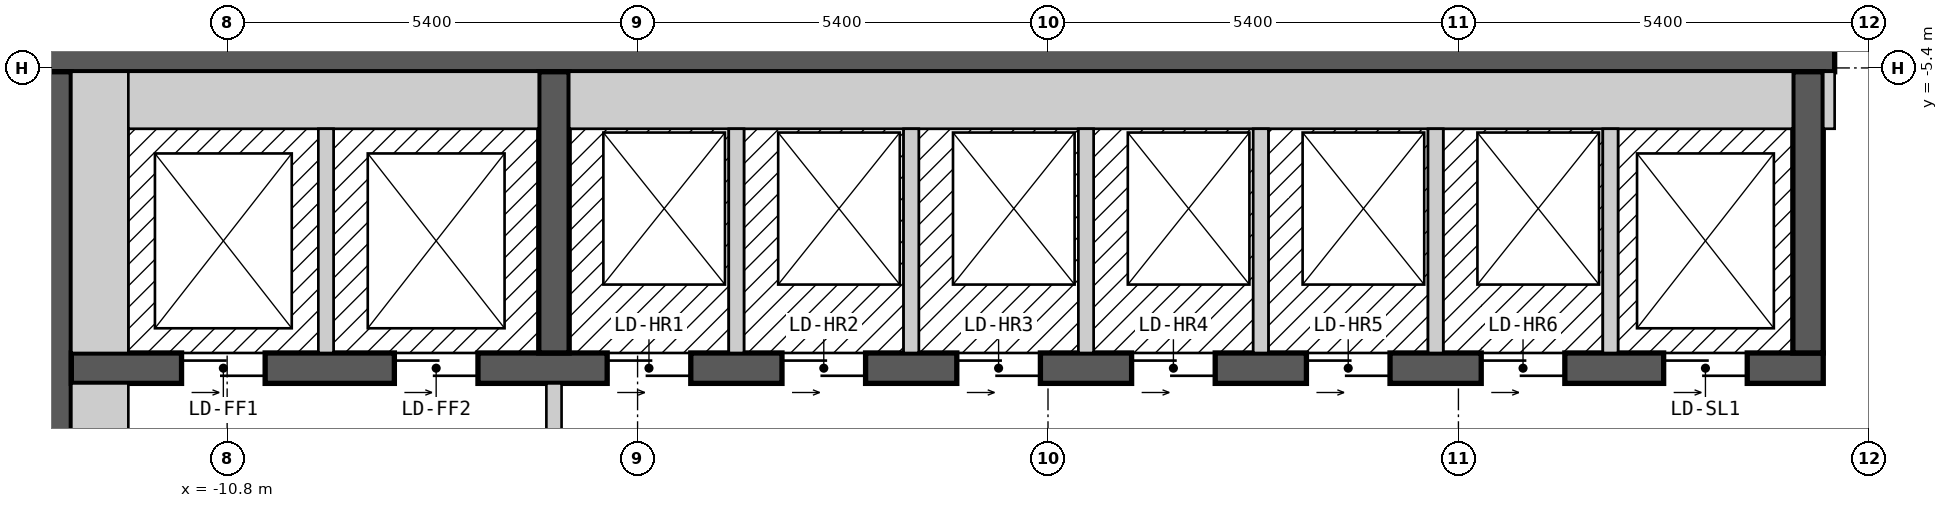
"""IFC4 building model, lengths in metres.
Left out: names, types, materials, properties, quantities, classifications, styles, units other than length and angle.
Written with IfcOpenShell. Run it as: python <this file> out.ifc"""

import sys

from ifc_helpers import new_model, si_unit, direction, frame, frame_2d, origin, place, context, subcontext, project, spatial, rectangle, extrude, element, fill, save


model = new_model("IFC4")
c1 = context("Model", 3, precision=1e-05, world=origin(), true_north=direction((0.0, 1.0)))
c2 = subcontext(c1, "Body", "Model", "MODEL_VIEW")
j1 = project(units=[si_unit("LENGTHUNIT", "METRE"), si_unit("PLANEANGLEUNIT", "RADIAN")], contexts=[c1])
p1 = place(None, origin())
s1 = spatial("IfcSite", under=j1, at=p1, CompositionType="ELEMENT")
p2 = place(p1, origin())
s2 = spatial("IfcBuilding", under=s1, at=p2, CompositionType="ELEMENT")
p3 = place(p2, frame((0.0, 0.0, 217.8)))
s3 = spatial("IfcBuildingStorey", under=s2, at=p3, CompositionType="ELEMENT", Elevation=217.8)
p4 = place(p3, frame((-13.3, -5.225, 0.0), z_axis=(0.0, 0.0, 1.0), x_axis=(1.0, 0.0, 0.0)))
e1 = element("IfcWall", 1, at=p4, inside=s3, PredefinedType="SHEAR", context=c2, shape_type="SweptSolid", body=[
    extrude(rectangle(XDim=26.6, YDim=0.45, at=frame_2d((13.3, 0.0))), origin(), (0.0, 0.0, 1.0), 2.7),
])
p5 = place(p4, frame((23.65, 0.0, 0.0)))
e2 = element("IfcOpeningElement", 2, at=p5, cuts=e1, PredefinedType="OPENING", context=c2, shape_type="SweptSolid", body=[
    extrude(rectangle(XDim=1.2, YDim=2.1, at=frame_2d((0.6, 1.05))), frame((0.0, 0.235, 0.0), z_axis=(0.0, -1.0, 0.0), x_axis=(1.0, 0.0, 0.0)), (0.0, 0.0, 1.0), 0.47),
])
p6 = place(p3, frame((-13.075, -18.55, 0.0), z_axis=(0.0, 0.0, 1.0), x_axis=(0.0, 1.0, 0.0)))
e3 = element("IfcWall", 3, at=p6, inside=s3, PredefinedType="SHEAR", context=c2, shape_type="SweptSolid", body=[
    extrude(rectangle(XDim=13.1, YDim=0.45, at=frame_2d((6.55, 0.0))), origin(), (0.0, 0.0, 1.0), 2.7),
])
p7 = place(p6, frame((4.35, 0.0, 0.0)))
e4 = element("IfcOpeningElement", 4, at=p7, cuts=e3, PredefinedType="OPENING", context=c2, shape_type="SweptSolid", body=[
    extrude(rectangle(XDim=1.2, YDim=2.1, at=frame_2d((0.6, 1.05))), frame((0.0, 0.235, 0.0), z_axis=(0.0, -1.0, 0.0), x_axis=(1.0, 0.0, 0.0)), (0.0, 0.0, 1.0), 0.47),
])
p8 = place(p3, frame((-12.85, -9.35, 0.0), z_axis=(0.0, 0.0, 1.0), x_axis=(1.0, 0.0, 0.0)))
e5 = element("IfcWall", 5, at=p8, inside=s3, PredefinedType="SHEAR", context=c2, shape_type="SweptSolid", body=[
    extrude(rectangle(XDim=23.05, YDim=0.4, at=frame_2d((11.525, 0.0))), origin(), (0.0, 0.0, 1.0), 2.7),
])
p9 = place(p8, frame((1.45, 0.0, 0.0)))
e6 = element("IfcOpeningElement", 6, at=p9, cuts=e5, PredefinedType="OPENING", context=c2, shape_type="SweptSolid", body=[
    extrude(rectangle(XDim=1.1, YDim=2.1, at=frame_2d((0.55, 1.05))), frame((0.0, 0.21, 0.0), z_axis=(0.0, -1.0, 0.0), x_axis=(1.0, 0.0, 0.0)), (0.0, 0.0, 1.0), 0.42),
])
p10 = place(p8, frame((4.25, 0.0, 0.0)))
e7 = element("IfcOpeningElement", 7, at=p10, cuts=e5, PredefinedType="OPENING", context=c2, shape_type="SweptSolid", body=[
    extrude(rectangle(XDim=1.1, YDim=2.1, at=frame_2d((0.55, 1.05))), frame((0.0, 0.21, 0.0), z_axis=(0.0, -1.0, 0.0), x_axis=(1.0, 0.0, 0.0)), (0.0, 0.0, 1.0), 0.42),
])
p11 = place(p8, frame((7.05, 0.0, 0.0)))
e8 = element("IfcOpeningElement", 8, at=p11, cuts=e5, PredefinedType="OPENING", context=c2, shape_type="SweptSolid", body=[
    extrude(rectangle(XDim=1.1, YDim=2.1, at=frame_2d((0.55, 1.05))), frame((0.0, 0.21, 0.0), z_axis=(0.0, -1.0, 0.0), x_axis=(1.0, 0.0, 0.0)), (0.0, 0.0, 1.0), 0.42),
])
p12 = place(p8, frame((9.35, 0.0, 0.0)))
e9 = element("IfcOpeningElement", 9, at=p12, cuts=e5, PredefinedType="OPENING", context=c2, shape_type="SweptSolid", body=[
    extrude(rectangle(XDim=1.1, YDim=2.1, at=frame_2d((0.55, 1.05))), frame((0.0, 0.21, 0.0), z_axis=(0.0, -1.0, 0.0), x_axis=(1.0, 0.0, 0.0)), (0.0, 0.0, 1.0), 0.42),
])
p13 = place(p8, frame((11.65, 0.0, 0.0)))
e10 = element("IfcOpeningElement", 10, at=p13, cuts=e5, PredefinedType="OPENING", context=c2, shape_type="SweptSolid", body=[
    extrude(rectangle(XDim=1.1, YDim=2.1, at=frame_2d((0.55, 1.05))), frame((0.0, 0.21, 0.0), z_axis=(0.0, -1.0, 0.0), x_axis=(1.0, 0.0, 0.0)), (0.0, 0.0, 1.0), 0.42),
])
p14 = place(p8, frame((13.95, 0.0, 0.0)))
e11 = element("IfcOpeningElement", 11, at=p14, cuts=e5, PredefinedType="OPENING", context=c2, shape_type="SweptSolid", body=[
    extrude(rectangle(XDim=1.1, YDim=2.1, at=frame_2d((0.55, 1.05))), frame((0.0, 0.21, 0.0), z_axis=(0.0, -1.0, 0.0), x_axis=(1.0, 0.0, 0.0)), (0.0, 0.0, 1.0), 0.42),
])
p15 = place(p8, frame((16.25, 0.0, 0.0)))
e12 = element("IfcOpeningElement", 12, at=p15, cuts=e5, PredefinedType="OPENING", context=c2, shape_type="SweptSolid", body=[
    extrude(rectangle(XDim=1.1, YDim=2.1, at=frame_2d((0.55, 1.05))), frame((0.0, 0.21, 0.0), z_axis=(0.0, -1.0, 0.0), x_axis=(1.0, 0.0, 0.0)), (0.0, 0.0, 1.0), 0.42),
])
p16 = place(p8, frame((18.55, 0.0, 0.0)))
e13 = element("IfcOpeningElement", 13, at=p16, cuts=e5, PredefinedType="OPENING", context=c2, shape_type="SweptSolid", body=[
    extrude(rectangle(XDim=1.1, YDim=2.1, at=frame_2d((0.55, 1.05))), frame((0.0, 0.21, 0.0), z_axis=(0.0, -1.0, 0.0), x_axis=(1.0, 0.0, 0.0)), (0.0, 0.0, 1.0), 0.42),
])
p17 = place(p8, frame((20.95, 0.0, 0.0)))
e14 = element("IfcOpeningElement", 14, at=p17, cuts=e5, PredefinedType="OPENING", context=c2, shape_type="SweptSolid", body=[
    extrude(rectangle(XDim=1.1, YDim=2.1, at=frame_2d((0.55, 1.05))), frame((0.0, 0.21, 0.0), z_axis=(0.0, -1.0, 0.0), x_axis=(1.0, 0.0, 0.0)), (0.0, 0.0, 1.0), 0.42),
])
for number, where, z_axis, x_axis in (
    (15, (-6.5, -9.15, 0.0), (0.0, 0.0, 1.0), (0.0, 1.0, 0.0)),
    (16, (10.0, -9.15, 0.0), (0.0, 0.0, 1.0), (0.0, 1.0, 0.0)),
):
    element("IfcWall", number, at=place(p3, frame(where, z_axis=z_axis, x_axis=x_axis)), inside=s3, PredefinedType="SHEAR", context=c2, shape_type="SweptSolid", body=[
        extrude(rectangle(XDim=3.7, YDim=0.4, at=frame_2d((1.85, 0.0))), origin(), (0.0, 0.0, 1.0), 2.7),
    ])
p18 = place(p3, frame((-12.475, -13.0, 0.0), z_axis=(0.0, 0.0, 1.0), x_axis=(0.0, 1.0, 0.0)))
e17 = element("IfcWall", 17, at=p18, inside=s3, PredefinedType="PARTITIONING", context=c2, shape_type="SweptSolid", body=[
    extrude(rectangle(XDim=3.45, YDim=0.75, at=frame_2d((1.725, 0.0))), origin(), (0.0, 0.0, 1.0), 2.7),
])
p19 = place(p3, frame((-12.475, -9.15, 0.0), z_axis=(0.0, 0.0, 1.0), x_axis=(0.0, 1.0, 0.0)))
e18 = element("IfcWall", 18, at=p19, inside=s3, PredefinedType="SOLIDWALL", context=c2, shape_type="SweptSolid", body=[
    extrude(rectangle(XDim=3.7, YDim=0.75, at=frame_2d((1.85, 0.0))), origin(), (0.0, 0.0, 1.0), 2.7),
])
p20 = place(p3, frame((-12.1, -5.825, 0.0), z_axis=(0.0, 0.0, 1.0), x_axis=(1.0, 0.0, 0.0)))
e19 = element("IfcWall", 19, at=p20, inside=s3, PredefinedType="SOLIDWALL", context=c2, shape_type="SweptSolid", body=[
    extrude(rectangle(XDim=5.4, YDim=0.75, at=frame_2d((2.7, 0.0))), origin(), (0.0, 0.0, 1.0), 2.7),
])
p21 = place(p3, frame((-9.5, -9.15, 0.0), z_axis=(0.0, 0.0, 1.0), x_axis=(0.0, 1.0, 0.0)))
e20 = element("IfcWall", 20, at=p21, inside=s3, PredefinedType="SOLIDWALL", context=c2, shape_type="SweptSolid", body=[
    extrude(rectangle(XDim=2.95, YDim=0.2, at=frame_2d((1.475, 0.0))), origin(), (0.0, 0.0, 1.0), 2.7),
])
p22 = place(p3, frame((-6.5, -14.45, 0.0), z_axis=(0.0, 0.0, 1.0), x_axis=(0.0, 1.0, 0.0)))
e21 = element("IfcWall", 21, at=p22, inside=s3, PredefinedType="PARTITIONING", context=c2, shape_type="SweptSolid", body=[
    extrude(rectangle(XDim=4.9, YDim=0.2, at=frame_2d((2.45, 0.0))), origin(), (0.0, 0.0, 1.0), 2.7),
])
p23 = place(p22, frame((3.15, 0.0, 0.0), z_axis=(0.0, 0.0, 1.0), x_axis=(-1.0, 0.0, 0.0)))
e22 = element("IfcOpeningElement", 22, at=p23, cuts=e21, PredefinedType="OPENING", context=c2, shape_type="SweptSolid", body=[
    extrude(rectangle(XDim=1.4, YDim=2.1, at=frame_2d((0.7, 1.05))), frame((0.0, 0.11, 0.0), z_axis=(0.0, -1.0, 0.0), x_axis=(1.0, 0.0, 0.0)), (0.0, 0.0, 1.0), 0.22),
])
p24 = place(p3, frame((-6.3, -5.825, 0.0), z_axis=(0.0, 0.0, 1.0), x_axis=(1.0, 0.0, 0.0)))
e23 = element("IfcWall", 23, at=p24, inside=s3, PredefinedType="SOLIDWALL", context=c2, shape_type="SweptSolid", body=[
    extrude(rectangle(XDim=16.1, YDim=0.75, at=frame_2d((8.05, 0.0))), origin(), (0.0, 0.0, 1.0), 2.7),
])
for number, where, z_axis, x_axis in (
    (24, (-4.1, -9.15, 0.0), (0.0, 0.0, 1.0), (0.0, 1.0, 0.0)),
    (25, (-1.8, -9.15, 0.0), (0.0, 0.0, 1.0), (0.0, 1.0, 0.0)),
    (26, (0.5, -9.15, 0.0), (0.0, 0.0, 1.0), (0.0, 1.0, 0.0)),
    (27, (2.8, -9.15, 0.0), (0.0, 0.0, 1.0), (0.0, 1.0, 0.0)),
    (28, (5.1, -9.15, 0.0), (0.0, 0.0, 1.0), (0.0, 1.0, 0.0)),
    (29, (7.4, -9.15, 0.0), (0.0, 0.0, 1.0), (0.0, 1.0, 0.0)),
):
    element("IfcWall", number, at=place(p3, frame(where, z_axis=z_axis, x_axis=x_axis)), inside=s3, PredefinedType="SOLIDWALL", context=c2, shape_type="SweptSolid", body=[
        extrude(rectangle(XDim=2.95, YDim=0.2, at=frame_2d((1.475, 0.0))), origin(), (0.0, 0.0, 1.0), 2.7),
    ])
p25 = place(p3, frame((10.275, -6.2, 0.0), z_axis=(0.0, 0.0, 1.0), x_axis=(0.0, 1.0, 0.0)))
e30 = element("IfcWall", 30, at=p25, inside=s3, PredefinedType="PARTITIONING", context=c2, shape_type="SweptSolid", body=[
    extrude(rectangle(XDim=0.75, YDim=0.15, at=frame_2d((0.375, 0.0))), origin(), (0.0, 0.0, 1.0), 2.7),
])
p26 = place(p9, origin())
e31 = element("IfcDoor", 31, at=p26, inside=s3, OperationType="DOUBLE_DOOR_SLIDING", PredefinedType="DOOR", context=c2, shape_type="SweptSolid", body=[
    extrude(rectangle(XDim=1.1, YDim=2.1, at=frame_2d((0.55, 1.05))), frame((0.0, 0.025, 0.0), z_axis=(0.0, -1.0, 0.0), x_axis=(1.0, 0.0, 0.0)), (0.0, 0.0, 1.0), 0.05),
])
fill(e6, e31)
p27 = place(p10, origin())
e32 = element("IfcDoor", 32, at=p27, inside=s3, OperationType="DOUBLE_DOOR_SLIDING", PredefinedType="DOOR", context=c2, shape_type="SweptSolid", body=[
    extrude(rectangle(XDim=1.1, YDim=2.1, at=frame_2d((0.55, 1.05))), frame((0.0, 0.025, 0.0), z_axis=(0.0, -1.0, 0.0), x_axis=(1.0, 0.0, 0.0)), (0.0, 0.0, 1.0), 0.05),
])
fill(e7, e32)
p28 = place(p11, origin())
e33 = element("IfcDoor", 33, at=p28, inside=s3, OperationType="DOUBLE_DOOR_SLIDING", PredefinedType="DOOR", context=c2, shape_type="SweptSolid", body=[
    extrude(rectangle(XDim=1.1, YDim=2.1, at=frame_2d((0.55, 1.05))), frame((0.0, 0.025, 0.0), z_axis=(0.0, -1.0, 0.0), x_axis=(1.0, 0.0, 0.0)), (0.0, 0.0, 1.0), 0.05),
])
fill(e8, e33)
p29 = place(p12, origin())
e34 = element("IfcDoor", 34, at=p29, inside=s3, OperationType="DOUBLE_DOOR_SLIDING", PredefinedType="DOOR", context=c2, shape_type="SweptSolid", body=[
    extrude(rectangle(XDim=1.1, YDim=2.1, at=frame_2d((0.55, 1.05))), frame((0.0, 0.025, 0.0), z_axis=(0.0, -1.0, 0.0), x_axis=(1.0, 0.0, 0.0)), (0.0, 0.0, 1.0), 0.05),
])
fill(e9, e34)
p30 = place(p13, origin())
e35 = element("IfcDoor", 35, at=p30, inside=s3, OperationType="DOUBLE_DOOR_SLIDING", PredefinedType="DOOR", context=c2, shape_type="SweptSolid", body=[
    extrude(rectangle(XDim=1.1, YDim=2.1, at=frame_2d((0.55, 1.05))), frame((0.0, 0.025, 0.0), z_axis=(0.0, -1.0, 0.0), x_axis=(1.0, 0.0, 0.0)), (0.0, 0.0, 1.0), 0.05),
])
fill(e10, e35)
p31 = place(p14, origin())
e36 = element("IfcDoor", 36, at=p31, inside=s3, OperationType="DOUBLE_DOOR_SLIDING", PredefinedType="DOOR", context=c2, shape_type="SweptSolid", body=[
    extrude(rectangle(XDim=1.1, YDim=2.1, at=frame_2d((0.55, 1.05))), frame((0.0, 0.025, 0.0), z_axis=(0.0, -1.0, 0.0), x_axis=(1.0, 0.0, 0.0)), (0.0, 0.0, 1.0), 0.05),
])
fill(e11, e36)
p32 = place(p15, origin())
e37 = element("IfcDoor", 37, at=p32, inside=s3, OperationType="DOUBLE_DOOR_SLIDING", PredefinedType="DOOR", context=c2, shape_type="SweptSolid", body=[
    extrude(rectangle(XDim=1.1, YDim=2.1, at=frame_2d((0.55, 1.05))), frame((0.0, 0.025, 0.0), z_axis=(0.0, -1.0, 0.0), x_axis=(1.0, 0.0, 0.0)), (0.0, 0.0, 1.0), 0.05),
])
fill(e12, e37)
p33 = place(p16, origin())
e38 = element("IfcDoor", 38, at=p33, inside=s3, OperationType="DOUBLE_DOOR_SLIDING", PredefinedType="DOOR", context=c2, shape_type="SweptSolid", body=[
    extrude(rectangle(XDim=1.1, YDim=2.1, at=frame_2d((0.55, 1.05))), frame((0.0, 0.025, 0.0), z_axis=(0.0, -1.0, 0.0), x_axis=(1.0, 0.0, 0.0)), (0.0, 0.0, 1.0), 0.05),
])
fill(e13, e38)
p34 = place(p17, origin())
e39 = element("IfcDoor", 39, at=p34, inside=s3, OperationType="DOUBLE_DOOR_SLIDING", PredefinedType="DOOR", context=c2, shape_type="SweptSolid", body=[
    extrude(rectangle(XDim=1.1, YDim=2.1, at=frame_2d((0.55, 1.05))), frame((0.0, 0.025, 0.0), z_axis=(0.0, -1.0, 0.0), x_axis=(1.0, 0.0, 0.0)), (0.0, 0.0, 1.0), 0.05),
])
fill(e14, e39)
p35 = place(p5, origin())
e40 = element("IfcDoor", 40, at=p35, inside=s3, OperationType="DOUBLE_DOOR_SINGLE_SWING", PredefinedType="DOOR", context=c2, shape_type="SweptSolid", body=[
    extrude(rectangle(XDim=1.2, YDim=2.1, at=frame_2d((0.6, 1.05))), frame((0.0, 0.025, 0.0), z_axis=(0.0, -1.0, 0.0), x_axis=(1.0, 0.0, 0.0)), (0.0, 0.0, 1.0), 0.05),
])
fill(e2, e40)
save(model, sys.argv[1])
